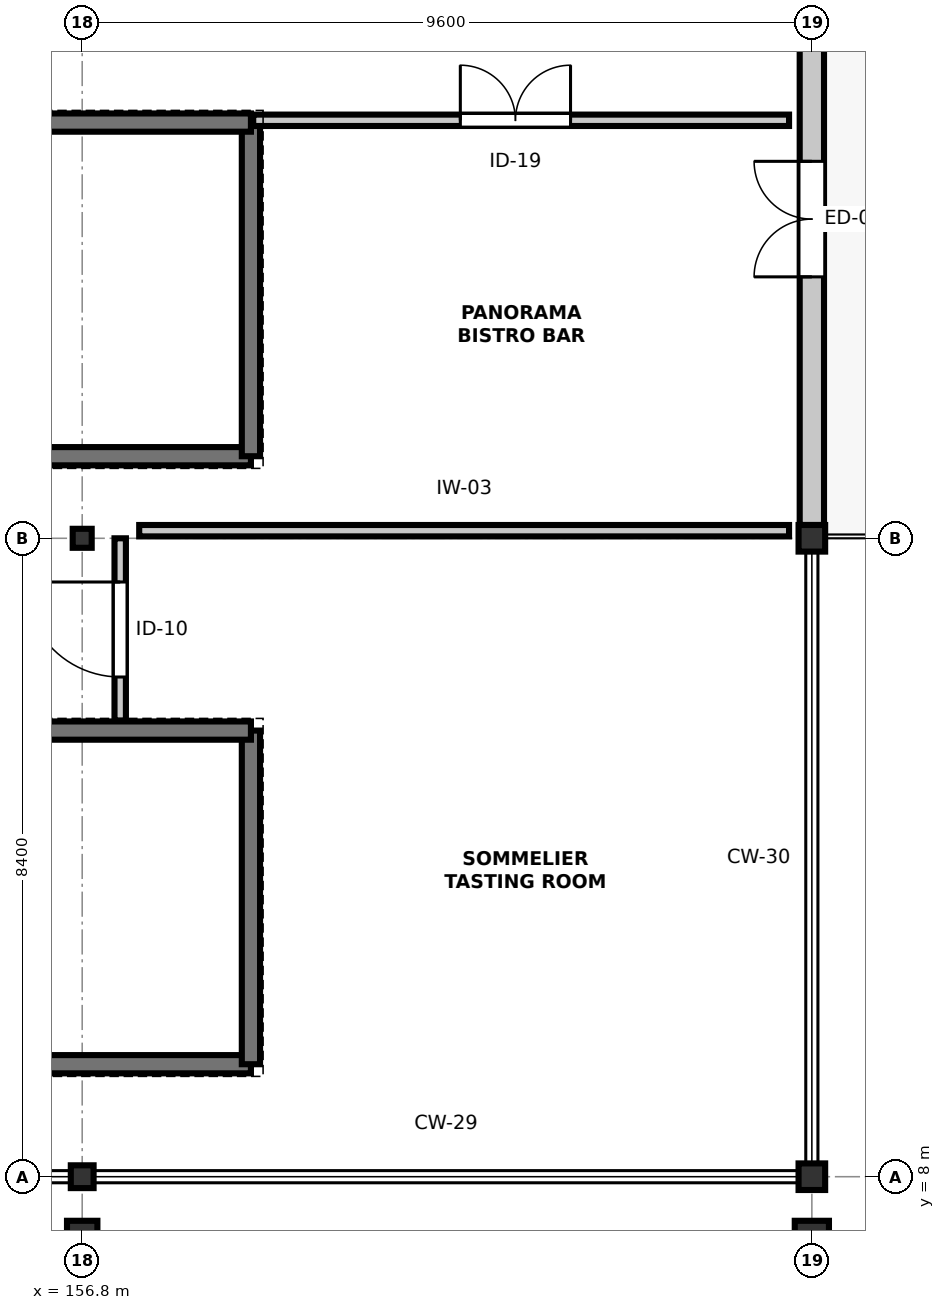
"""IFC4 building model, lengths in metres.
Left out: names, types, materials, properties, quantities, classifications, styles, units other than length and angle.
Written with IfcOpenShell. Run it as: python <this file> out.ifc"""

import sys

from ifc_helpers import new_model, si_unit, direction, frame, frame_2d, origin, origin_2d, place, context, subcontext, project, spatial, rectangle, i_section, extrude, element, fill, save


model = new_model("IFC4")
c1 = context("Model", 3, precision=1e-05, world=origin(), true_north=direction((0.0, 1.0)))
c2 = subcontext(c1, "Body", "Model", "MODEL_VIEW")
j1 = project(units=[si_unit("LENGTHUNIT", "METRE"), si_unit("PLANEANGLEUNIT", "RADIAN")], contexts=[c1])
p1 = place(None, origin())
s1 = spatial("IfcSite", under=j1, at=p1, CompositionType="ELEMENT")
p2 = place(p1, origin())
s2 = spatial("IfcBuilding", under=s1, at=p2, CompositionType="ELEMENT")
p3 = place(p2, frame((0.0, 0.0, 14.4)))
s3 = spatial("IfcBuildingStorey", under=s2, at=p3, CompositionType="ELEMENT", Elevation=14.4)
p4 = place(p3, frame((156.8, 8.0, 0.0), z_axis=(0.0, 0.0, 1.0), x_axis=(1.0, 0.0, 0.0)))
e1 = element("IfcColumn", 1, at=p4, inside=s3, PredefinedType="COLUMN", context=c2, shape_type="SweptSolid", body=[
    extrude(i_section(OverallWidth=0.3, OverallDepth=0.3, WebThickness=0.01, FlangeThickness=0.015, FilletRadius=0.018, at=origin_2d()), origin(), (0.0, 0.0, 1.0), 4.8),
])
p5 = place(p3, frame((156.8, 7.095, 0.0), z_axis=(0.0, 0.0, 1.0), x_axis=(1.0, 0.0, 0.0)))
e2 = element("IfcColumn", 2, at=p5, inside=s3, PredefinedType="PILASTER", context=c2, shape_type="SweptSolid", body=[
    extrude(rectangle(XDim=0.4, YDim=0.65, at=origin_2d()), origin(), (0.0, 0.0, 1.0), 4.8),
])
p6 = place(p3, frame((156.8, 16.4, 0.0), z_axis=(0.0, 0.0, 1.0), x_axis=(1.0, 0.0, 0.0)))
e3 = element("IfcColumn", 3, at=p6, inside=s3, PredefinedType="COLUMN", context=c2, shape_type="SweptSolid", body=[
    extrude(i_section(OverallWidth=0.25, OverallDepth=0.25, WebThickness=0.009, FlangeThickness=0.014, FilletRadius=0.016, at=origin_2d()), origin(), (0.0, 0.0, 1.0), 4.8),
])
p7 = place(p3, frame((166.4, 8.0, 0.0), z_axis=(0.0, 0.0, 1.0), x_axis=(1.0, 0.0, 0.0)))
e4 = element("IfcColumn", 4, at=p7, inside=s3, PredefinedType="COLUMN", context=c2, shape_type="SweptSolid", body=[
    extrude(i_section(OverallWidth=0.35, OverallDepth=0.35, WebThickness=0.012, FlangeThickness=0.019, FilletRadius=0.02, at=origin_2d()), origin(), (0.0, 0.0, 1.0), 4.8),
])
p8 = place(p3, frame((166.4, 7.045, 0.0), z_axis=(0.0, 0.0, 1.0), x_axis=(1.0, 0.0, 0.0)))
e5 = element("IfcColumn", 5, at=p8, inside=s3, PredefinedType="PILASTER", context=c2, shape_type="SweptSolid", body=[
    extrude(rectangle(XDim=0.45, YDim=0.75, at=origin_2d()), origin(), (0.0, 0.0, 1.0), 4.8),
])
p9 = place(p3, frame((166.4, 16.4, 0.0), z_axis=(0.0, 0.0, 1.0), x_axis=(1.0, 0.0, 0.0)))
e6 = element("IfcColumn", 6, at=p9, inside=s3, PredefinedType="COLUMN", context=c2, shape_type="SweptSolid", body=[
    extrude(i_section(OverallWidth=0.35, OverallDepth=0.35, WebThickness=0.012, FlangeThickness=0.019, FilletRadius=0.02, at=origin_2d()), origin(), (0.0, 0.0, 1.0), 4.8),
])
p10 = place(p3, frame((166.4, 16.575, 0.0), z_axis=(0.0, 0.0, 1.0), x_axis=(0.0, 1.0, 0.0)))
e7 = element("IfcWall", 7, at=p10, inside=s3, PredefinedType="STANDARD", context=c2, shape_type="SweptSolid", body=[
    extrude(rectangle(XDim=8.05, YDim=0.32, at=frame_2d((4.025, 0.0))), origin(), (0.0, 0.0, 1.0), 3.997),
])
p11 = place(p10, frame((3.265, 0.0, 0.0)))
e8 = element("IfcOpeningElement", 8, at=p11, cuts=e7, PredefinedType="OPENING", context=c2, shape_type="SweptSolid", body=[
    extrude(rectangle(XDim=1.52, YDim=2.22, at=frame_2d((0.76, 1.11))), frame((0.0, 0.17, 0.0), z_axis=(0.0, -1.0, 0.0), x_axis=(1.0, 0.0, 0.0)), (0.0, 0.0, 1.0), 0.34),
])
p12 = place(p3, frame((149.68, 9.48, 0.0), z_axis=(0.0, 0.0, 1.0), x_axis=(1.0, 0.0, 0.0)))
e9 = element("IfcWall", 9, at=p12, inside=s3, PredefinedType="SHEAR", context=c2, shape_type="SweptSolid", body=[
    extrude(rectangle(XDim=9.34, YDim=0.24, at=frame_2d((4.67, 0.0))), origin(), (0.0, 0.0, 1.0), 4.5),
])
p13 = place(p3, frame((159.02, 9.48, 0.0), z_axis=(0.0, 0.0, 1.0), x_axis=(0.0, 1.0, 0.0)))
e10 = element("IfcWall", 10, at=p13, inside=s3, PredefinedType="SHEAR", context=c2, shape_type="SweptSolid", body=[
    extrude(rectangle(XDim=4.39, YDim=0.24, at=frame_2d((2.195, 0.0))), origin(), (0.0, 0.0, 1.0), 4.5),
])
for number, where, z_axis, x_axis in (
    (11, (159.02, 13.87, 0.0), (0.0, 0.0, 1.0), (-1.0, 0.0, 0.0)),
    (12, (149.68, 17.48, 0.0), (0.0, 0.0, 1.0), (1.0, 0.0, 0.0)),
):
    element("IfcWall", number, at=place(p3, frame(where, z_axis=z_axis, x_axis=x_axis)), inside=s3, PredefinedType="SHEAR", context=c2, shape_type="SweptSolid", body=[
        extrude(rectangle(XDim=9.34, YDim=0.24, at=frame_2d((4.67, 0.0))), origin(), (0.0, 0.0, 1.0), 4.5),
    ])
p14 = place(p3, frame((159.02, 17.48, 0.0), z_axis=(0.0, 0.0, 1.0), x_axis=(0.0, 1.0, 0.0)))
e13 = element("IfcWall", 13, at=p14, inside=s3, PredefinedType="SHEAR", context=c2, shape_type="SweptSolid", body=[
    extrude(rectangle(XDim=4.39, YDim=0.24, at=frame_2d((2.195, 0.0))), origin(), (0.0, 0.0, 1.0), 4.5),
])
p15 = place(p3, frame((159.02, 21.87, 0.0), z_axis=(0.0, 0.0, 1.0), x_axis=(-1.0, 0.0, 0.0)))
e14 = element("IfcWall", 14, at=p15, inside=s3, PredefinedType="SHEAR", context=c2, shape_type="SweptSolid", body=[
    extrude(rectangle(XDim=9.34, YDim=0.24, at=frame_2d((4.67, 0.0))), origin(), (0.0, 0.0, 1.0), 4.5),
])
p16 = place(p3, frame((159.05, 21.9, 0.0), z_axis=(0.0, 0.0, 1.0), x_axis=(1.0, 0.0, 0.0)))
e15 = element("IfcWall", 15, at=p16, inside=s3, PredefinedType="PARTITIONING", context=c2, shape_type="SweptSolid", body=[
    extrude(rectangle(XDim=7.05, YDim=0.15, at=frame_2d((3.525, 0.0))), origin(), (0.0, 0.0, 1.0), 4.485),
])
p17 = place(p16, frame((2.725, 0.0, 0.0)))
e16 = element("IfcOpeningElement", 16, at=p17, cuts=e15, PredefinedType="OPENING", context=c2, shape_type="SweptSolid", body=[
    extrude(rectangle(XDim=1.45, YDim=2.22, at=frame_2d((0.725, 1.11))), frame((0.0, 0.085, 0.0), z_axis=(0.0, -1.0, 0.0), x_axis=(1.0, 0.0, 0.0)), (0.0, 0.0, 1.0), 0.17),
])
p18 = place(p3, frame((157.3, 14.0, 0.0), z_axis=(0.0, 0.0, 1.0), x_axis=(0.0, 1.0, 0.0)))
e17 = element("IfcWall", 17, at=p18, inside=s3, PredefinedType="PARTITIONING", context=c2, shape_type="SweptSolid", body=[
    extrude(rectangle(XDim=2.4, YDim=0.15, at=frame_2d((1.2, 0.0))), origin(), (0.0, 0.0, 1.0), 3.997),
])
p19 = place(p18, frame((0.575, 0.0, 0.0)))
e18 = element("IfcOpeningElement", 18, at=p19, cuts=e17, PredefinedType="OPENING", context=c2, shape_type="SweptSolid", body=[
    extrude(rectangle(XDim=1.25, YDim=2.16, at=frame_2d((0.625, 1.08))), frame((0.0, 0.085, 0.0), z_axis=(0.0, -1.0, 0.0), x_axis=(1.0, 0.0, 0.0)), (0.0, 0.0, 1.0), 0.17),
])
p20 = place(p3, frame((157.55, 16.5, 0.0), z_axis=(0.0, 0.0, 1.0), x_axis=(1.0, 0.0, 0.0)))
e19 = element("IfcWall", 19, at=p20, inside=s3, PredefinedType="PARTITIONING", context=c2, shape_type="SweptSolid", body=[
    extrude(rectangle(XDim=8.55, YDim=0.15, at=frame_2d((4.275, 0.0))), origin(), (0.0, 0.0, 1.0), 3.997),
])
p21 = place(p11, origin())
e20 = element("IfcDoor", 20, at=p21, inside=s3, OperationType="DOUBLE_DOOR_SINGLE_SWING", PredefinedType="DOOR", context=c2, shape_type="SweptSolid", body=[
    extrude(rectangle(XDim=1.52, YDim=2.22, at=frame_2d((0.76, 1.11))), frame((0.0, 0.025, 0.0), z_axis=(0.0, -1.0, 0.0), x_axis=(1.0, 0.0, 0.0)), (0.0, 0.0, 1.0), 0.05),
])
fill(e8, e20)
p22 = place(p17, origin())
e21 = element("IfcDoor", 21, at=p22, inside=s3, OperationType="DOUBLE_DOOR_SINGLE_SWING", PredefinedType="DOOR", context=c2, shape_type="SweptSolid", body=[
    extrude(rectangle(XDim=1.45, YDim=2.22, at=frame_2d((0.725, 1.11))), frame((0.0, 0.025, 0.0), z_axis=(0.0, -1.0, 0.0), x_axis=(1.0, 0.0, 0.0)), (0.0, 0.0, 1.0), 0.05),
])
fill(e16, e21)
p23 = place(p19, origin())
e22 = element("IfcDoor", 22, at=p23, inside=s3, OperationType="SINGLE_SWING_RIGHT", PredefinedType="DOOR", context=c2, shape_type="SweptSolid", body=[
    extrude(rectangle(XDim=1.25, YDim=2.16, at=frame_2d((0.625, 1.08))), frame((0.0, 0.025, 0.0), z_axis=(0.0, -1.0, 0.0), x_axis=(1.0, 0.0, 0.0)), (0.0, 0.0, 1.0), 0.05),
])
fill(e18, e22)
save(model, sys.argv[1])
